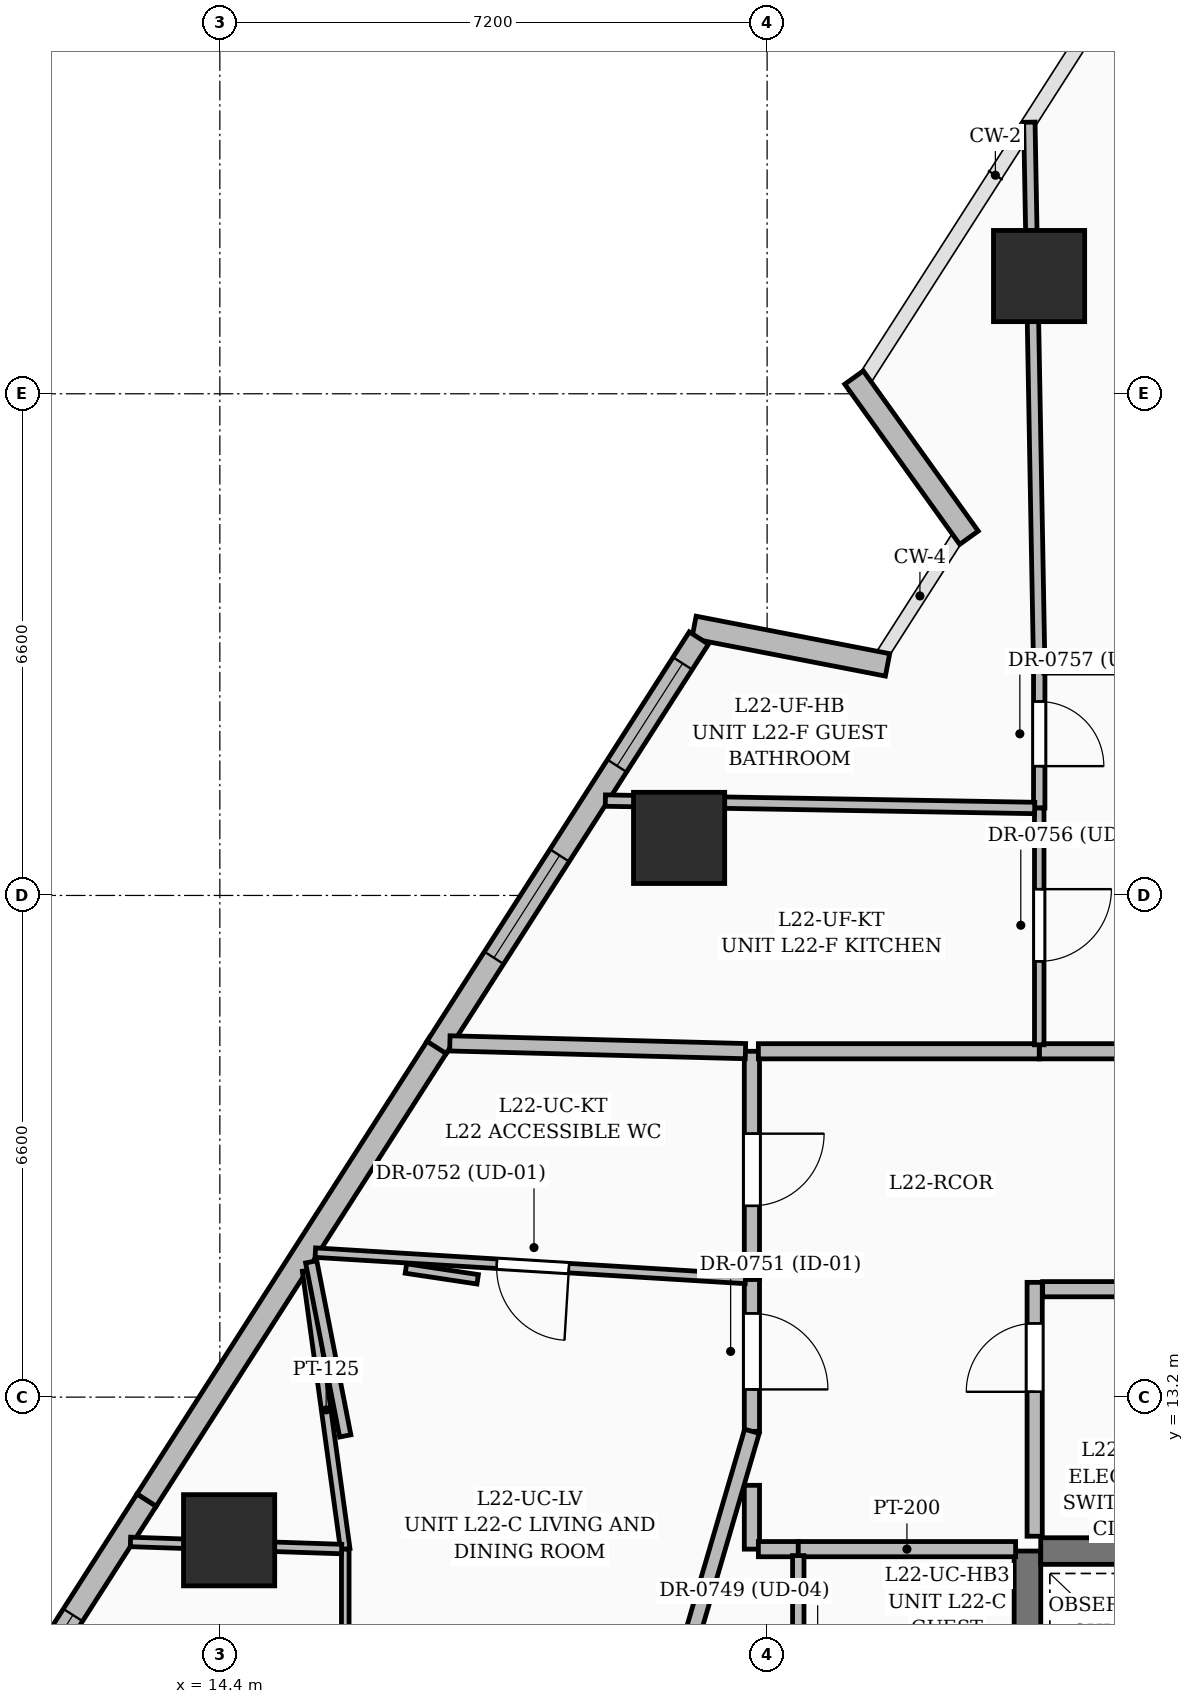
"""IFC4 building model, lengths in metres.
Left out: names, types, materials, properties, quantities, classifications, styles, units other than length and angle.
Written with IfcOpenShell. Run it as: python <this file> out.ifc"""

import sys

from ifc_helpers import new_model, si_unit, direction, frame, frame_2d, origin, origin_2d, place, context, subcontext, project, spatial, rectangle, extrude, element, fill, save


model = new_model("IFC4")
c1 = context("Model", 3, precision=1e-05, world=origin(), true_north=direction((0.0, 1.0)))
c2 = subcontext(c1, "Body", "Model", "MODEL_VIEW")
j1 = project(units=[si_unit("LENGTHUNIT", "METRE"), si_unit("PLANEANGLEUNIT", "RADIAN")], contexts=[c1])
p1 = place(None, origin())
s1 = spatial("IfcSite", under=j1, at=p1, CompositionType="ELEMENT")
p2 = place(p1, origin())
s2 = spatial("IfcBuilding", under=s1, at=p2, CompositionType="ELEMENT")
p3 = place(p2, frame((0.0, 0.0, 89.4)))
s3 = spatial("IfcBuildingStorey", under=s2, at=p3, CompositionType="ELEMENT", Elevation=89.4)
p4 = place(p3, frame((25.025, 6.225, 0.0), z_axis=(0.0, 0.0, 1.0), x_axis=(0.0, 1.0, 0.0)))
e1 = element("IfcWall", 1, at=p4, inside=s3, PredefinedType="SOLIDWALL", context=c2, shape_type="SweptSolid", body=[
    extrude(rectangle(XDim=4.95, YDim=0.35, at=frame_2d((2.475, 0.0))), origin(), (0.0, 0.0, 1.0), 3.6),
])
p5 = place(p3, frame((25.2, 11.175, 0.0), z_axis=(0.0, 0.0, 1.0), x_axis=(1.0, 0.0, 0.0)))
e2 = element("IfcWall", 2, at=p5, inside=s3, PredefinedType="SOLIDWALL", context=c2, shape_type="SweptSolid", body=[
    extrude(rectangle(XDim=1.9, YDim=0.35, at=frame_2d((0.95, 0.0))), origin(), (0.0, 0.0, 1.0), 3.6),
])
for number, where, z_axis, x_axis in (
    (3, (25.178, 27.949, 0.0), (0.0, 0.0, 1.0), (1.0, 0.0, 0.0)),
    (4, (20.442, 20.557, 0.0), (0.0, 0.0, 1.0), (1.0, 0.0, 0.0)),
    (5, (14.522, 11.317, 0.0), (0.0, 0.0, 1.0), (1.0, 0.0, 0.0)),
):
    element("IfcColumn", number, at=place(p3, frame(where, z_axis=z_axis, x_axis=x_axis)), inside=s3, PredefinedType="COLUMN", context=c2, shape_type="SweptSolid", body=[
        extrude(rectangle(XDim=1.2, YDim=1.2, at=origin_2d()), origin(), (0.0, 0.0, 1.0), 3.6),
    ])
p6 = place(p3, frame((20.638, 23.327, 0.0), z_axis=(0.0, 0.0, 1.0), x_axis=(0.981760587394, -0.190121406053, 0.0)))
e6 = element("IfcWall", 6, at=p6, inside=s3, PredefinedType="SOLIDWALL", context=c2, shape_type="SweptSolid", body=[
    extrude(rectangle(XDim=2.594, YDim=0.3, at=frame_2d((1.297, 0.0))), origin(), (0.0, 0.0, 1.0), 2.375),
])
p7 = place(p3, frame((24.256, 24.506, 0.0), z_axis=(0.0, 0.0, 1.0), x_axis=(-0.58299973372, 0.812472344442, 0.0)))
e7 = element("IfcWall", 7, at=p7, inside=s3, PredefinedType="SOLIDWALL", context=c2, shape_type="SweptSolid", body=[
    extrude(rectangle(XDim=2.594, YDim=0.3, at=frame_2d((1.297, 0.0))), origin(), (0.0, 0.0, 1.0), 2.375),
])
p8 = place(p3, frame((10.059, 6.574, 0.0), z_axis=(0.0, 0.0, 1.0), x_axis=(0.539474072839, 0.842002211835, 0.0)))
e8 = element("IfcWall", 8, at=p8, inside=s3, PredefinedType="SOLIDWALL", context=c2, shape_type="SweptSolid", body=[
    extrude(rectangle(XDim=6.261, YDim=0.3, at=frame_2d((3.131, 0.0))), origin(), (0.0, 0.0, 1.0), 3.35),
])
p9 = place(p8, frame((2.365, 0.0, 0.55)))
e9 = element("IfcOpeningElement", 9, at=p9, cuts=e8, PredefinedType="OPENING", context=c2, shape_type="SweptSolid", body=[
    extrude(rectangle(XDim=2.1, YDim=2.4, at=frame_2d((1.05, 1.2))), frame((0.0, 0.16, 0.0), z_axis=(0.0, -1.0, 0.0), x_axis=(1.0, 0.0, 0.0)), (0.0, 0.0, 1.0), 0.32),
])
p10 = place(p3, frame((13.437, 11.846, 0.0), z_axis=(0.0, 0.0, 1.0), x_axis=(0.539467581629, 0.842006370743, 0.0)))
e10 = element("IfcWall", 10, at=p10, inside=s3, PredefinedType="SOLIDWALL", context=c2, shape_type="SweptSolid", body=[
    extrude(rectangle(XDim=7.13, YDim=0.3, at=frame_2d((3.565, 0.0))), origin(), (0.0, 0.0, 1.0), 3.35),
])
p11 = place(p3, frame((17.251, 17.8, 0.0), z_axis=(0.0, 0.0, 1.0), x_axis=(0.539458702909, 0.84201205921, 0.0)))
e11 = element("IfcWall", 11, at=p11, inside=s3, PredefinedType="SOLIDWALL", context=c2, shape_type="SweptSolid", body=[
    extrude(rectangle(XDim=6.396, YDim=0.3, at=frame_2d((3.198, 0.0))), origin(), (0.0, 0.0, 1.0), 3.35),
])
p12 = place(p11, frame((4.4, 0.0, 0.55)))
e12 = element("IfcOpeningElement", 12, at=p12, cuts=e11, PredefinedType="OPENING", context=c2, shape_type="SweptSolid", body=[
    extrude(rectangle(XDim=1.6, YDim=2.2, at=frame_2d((0.8, 1.1))), frame((0.0, 0.16, 0.0), z_axis=(0.0, -1.0, 0.0), x_axis=(1.0, 0.0, 0.0)), (0.0, 0.0, 1.0), 0.32),
])
p13 = place(p11, frame((1.4, 0.0, 0.55)))
e13 = element("IfcOpeningElement", 13, at=p13, cuts=e11, PredefinedType="OPENING", context=c2, shape_type="SweptSolid", body=[
    extrude(rectangle(XDim=1.6, YDim=2.2, at=frame_2d((0.8, 1.1))), frame((0.0, 0.16, 0.0), z_axis=(0.0, -1.0, 0.0), x_axis=(1.0, 0.0, 0.0)), (0.0, 0.0, 1.0), 0.32),
])
p14 = place(p3, frame((25.12, 11.37, 0.0), z_axis=(0.0, 0.0, 1.0), x_axis=(0.0, 1.0, 0.0)))
e14 = element("IfcWall", 14, at=p14, inside=s3, PredefinedType="PARTITIONING", context=c2, shape_type="SweptSolid", body=[
    extrude(rectangle(XDim=3.34, YDim=0.2, at=frame_2d((1.67, 0.0))), origin(), (0.0, 0.0, 1.0), 3.35),
])
p15 = place(p14, frame((1.9, 0.0, 0.0)))
e15 = element("IfcOpeningElement", 15, at=p15, cuts=e14, PredefinedType="OPENING", context=c2, shape_type="SweptSolid", body=[
    extrude(rectangle(XDim=0.9, YDim=2.1, at=frame_2d((0.45, 1.05))), frame((0.0, 0.11, 0.0), z_axis=(0.0, -1.0, 0.0), x_axis=(1.0, 0.0, 0.0)), (0.0, 0.0, 1.0), 0.22),
])
p16 = place(p3, frame((25.225, 14.62, 0.0), z_axis=(0.0, 0.0, 1.0), x_axis=(1.0, 0.0, 0.0)))
e16 = element("IfcWall", 16, at=p16, inside=s3, PredefinedType="PARTITIONING", context=c2, shape_type="SweptSolid", body=[
    extrude(rectangle(XDim=1.86, YDim=0.2, at=frame_2d((0.93, 0.0))), origin(), (0.0, 0.0, 1.0), 3.35),
])
p17 = place(p3, frame((21.4, 12.04, 0.0), z_axis=(0.0, 0.0, 1.0), x_axis=(0.0, -1.0, 0.0)))
e17 = element("IfcWall", 17, at=p17, inside=s3, PredefinedType="PARTITIONING", context=c2, shape_type="SweptSolid", body=[
    extrude(rectangle(XDim=0.84, YDim=0.2, at=frame_2d((0.42, 0.0))), origin(), (0.0, 0.0, 1.0), 3.35),
])
p18 = place(p3, frame((21.485, 11.2, 0.0), z_axis=(0.0, 0.0, 1.0), x_axis=(1.0, 0.0, 0.0)))
e18 = element("IfcWall", 18, at=p18, inside=s3, PredefinedType="PARTITIONING", context=c2, shape_type="SweptSolid", body=[
    extrude(rectangle(XDim=0.525, YDim=0.2, at=frame_2d((0.262, 0.0))), origin(), (0.0, 0.0, 1.0), 3.35),
])
p19 = place(p3, frame((22.01, 11.2, 0.0), z_axis=(0.0, 0.0, 1.0), x_axis=(1.0, 0.0, 0.0)))
e19 = element("IfcWall", 19, at=p19, inside=s3, PredefinedType="PARTITIONING", context=c2, shape_type="SweptSolid", body=[
    extrude(rectangle(XDim=2.859, YDim=0.2, at=frame_2d((1.43, 0.0))), origin(), (0.0, 0.0, 1.0), 3.35),
])
p20 = place(p3, frame((21.4, 14.75, 0.0), z_axis=(0.0, 0.0, 1.0), x_axis=(0.0, -1.0, 0.0)))
e20 = element("IfcWall", 20, at=p20, inside=s3, PredefinedType="PARTITIONING", context=c2, shape_type="SweptSolid", body=[
    extrude(rectangle(XDim=2.0, YDim=0.2, at=frame_2d((1.0, 0.0))), origin(), (0.0, 0.0, 1.0), 2.771),
])
p21 = place(p20, frame((0.448, 0.0, 0.0)))
e21 = element("IfcOpeningElement", 21, at=p21, cuts=e20, PredefinedType="OPENING", context=c2, shape_type="SweptSolid", body=[
    extrude(rectangle(XDim=1.0, YDim=2.2, at=frame_2d((0.5, 1.1))), frame((0.0, 0.11, 0.0), z_axis=(0.0, -1.0, 0.0), x_axis=(1.0, 0.0, 0.0)), (0.0, 0.0, 1.0), 0.22),
])
p22 = place(p3, frame((21.4, 17.75, 0.0), z_axis=(0.0, 0.0, 1.0), x_axis=(0.0, -1.0, 0.0)))
e22 = element("IfcWall", 22, at=p22, inside=s3, PredefinedType="PARTITIONING", context=c2, shape_type="SweptSolid", body=[
    extrude(rectangle(XDim=3.0, YDim=0.2, at=frame_2d((1.5, 0.0))), origin(), (0.0, 0.0, 1.0), 2.771),
])
p23 = place(p22, frame((1.084, 0.0, 0.0)))
e23 = element("IfcOpeningElement", 23, at=p23, cuts=e22, PredefinedType="OPENING", context=c2, shape_type="SweptSolid", body=[
    extrude(rectangle(XDim=0.95, YDim=2.2, at=frame_2d((0.475, 1.1))), frame((0.0, 0.11, 0.0), z_axis=(0.0, -1.0, 0.0), x_axis=(1.0, 0.0, 0.0)), (0.0, 0.0, 1.0), 0.22),
])
p24 = place(p3, frame((33.34, 17.75, 0.0), z_axis=(0.0, 0.0, 1.0), x_axis=(-1.0, 0.0, 0.0)))
e24 = element("IfcWall", 24, at=p24, inside=s3, PredefinedType="PARTITIONING", context=c2, shape_type="SweptSolid", body=[
    extrude(rectangle(XDim=8.16, YDim=0.2, at=frame_2d((4.08, 0.0))), origin(), (0.0, 0.0, 1.0), 2.771),
])
p25 = place(p24, frame((3.58, 0.0, 0.0)))
e25 = element("IfcOpeningElement", 25, at=p25, cuts=e24, PredefinedType="OPENING", context=c2, shape_type="SweptSolid", body=[
    extrude(rectangle(XDim=1.0, YDim=2.2, at=frame_2d((0.5, 1.1))), frame((0.0, 0.11, 0.0), z_axis=(0.0, -1.0, 0.0), x_axis=(1.0, 0.0, 0.0)), (0.0, 0.0, 1.0), 0.22),
])
p26 = place(p3, frame((25.18, 17.75, 0.0), z_axis=(0.0, 0.0, 1.0), x_axis=(-1.0, 0.0, 0.0)))
e26 = element("IfcWall", 26, at=p26, inside=s3, PredefinedType="PARTITIONING", context=c2, shape_type="SweptSolid", body=[
    extrude(rectangle(XDim=3.695, YDim=0.2, at=frame_2d((1.847, 0.0))), origin(), (0.0, 0.0, 1.0), 2.345),
])
p27 = place(p3, frame((22.01, 7.57, 0.0), z_axis=(0.0, 0.0, 1.0), x_axis=(0.0, 1.0, 0.0)))
e27 = element("IfcWall", 27, at=p27, inside=s3, PredefinedType="PARTITIONING", context=c2, shape_type="SweptSolid", body=[
    extrude(rectangle(XDim=3.545, YDim=0.15, at=frame_2d((1.772, 0.0))), origin(), (0.0, 0.0, 1.0), 2.345),
])
p28 = place(p27, frame((1.688, 0.0, 0.0)))
e28 = element("IfcOpeningElement", 28, at=p28, cuts=e27, PredefinedType="OPENING", context=c2, shape_type="SweptSolid", body=[
    extrude(rectangle(XDim=0.85, YDim=2.1, at=frame_2d((0.425, 1.05))), frame((0.0, 0.085, 0.0), z_axis=(0.0, -1.0, 0.0), x_axis=(1.0, 0.0, 0.0)), (0.0, 0.0, 1.0), 0.17),
])
p29 = place(p3, frame((21.4, 12.75, 0.0), z_axis=(0.0, 0.0, 1.0), x_axis=(-0.281267694056, -0.959629347342, 0.0)))
e29 = element("IfcWall", 29, at=p29, inside=s3, PredefinedType="PARTITIONING", context=c2, shape_type="SweptSolid", body=[
    extrude(rectangle(XDim=11.313, YDim=0.2, at=frame_2d((5.656, 0.0))), origin(), (0.0, 0.0, 1.0), 2.345),
])
p30 = place(p29, frame((5.147, 0.0, 0.0)))
e30 = element("IfcOpeningElement", 30, at=p30, cuts=e29, PredefinedType="OPENING", context=c2, shape_type="SweptSolid", body=[
    extrude(rectangle(XDim=1.0, YDim=2.2, at=frame_2d((0.5, 1.1))), frame((0.0, 0.11, 0.0), z_axis=(0.0, -1.0, 0.0), x_axis=(1.0, 0.0, 0.0)), (0.0, 0.0, 1.0), 0.22),
])
p31 = place(p3, frame((21.315, 14.755, 0.0), z_axis=(0.0, 0.0, 1.0), x_axis=(-0.99813414118, 0.061059284391, 0.0)))
e31 = element("IfcWall", 31, at=p31, inside=s3, PredefinedType="PARTITIONING", context=c2, shape_type="SweptSolid", body=[
    extrude(rectangle(XDim=5.67, YDim=0.125, at=frame_2d((2.835, 0.0))), origin(), (0.0, 0.0, 1.0), 2.37),
])
p32 = place(p31, frame((2.327, 0.0, 0.0)))
e32 = element("IfcOpeningElement", 32, at=p32, cuts=e31, PredefinedType="OPENING", context=c2, shape_type="SweptSolid", body=[
    extrude(rectangle(XDim=0.95, YDim=2.2, at=frame_2d((0.475, 1.1))), frame((0.0, 0.072, 0.0), z_axis=(0.0, -1.0, 0.0), x_axis=(1.0, 0.0, 0.0)), (0.0, 0.0, 1.0), 0.145),
])
p33 = place(p3, frame((15.547, 14.865, 0.0), z_axis=(0.0, 0.0, 1.0), x_axis=(0.135967318148, -0.990713323013, 0.0)))
e33 = element("IfcWall", 33, at=p33, inside=s3, PredefinedType="PARTITIONING", context=c2, shape_type="SweptSolid", body=[
    extrude(rectangle(XDim=3.699, YDim=0.125, at=frame_2d((1.85, 0.0))), origin(), (0.0, 0.0, 1.0), 2.37),
])
p34 = place(p3, frame((16.05, 11.2, 0.0), z_axis=(0.0, 0.0, 1.0), x_axis=(0.0, -1.0, 0.0)))
e34 = element("IfcWall", 34, at=p34, inside=s3, PredefinedType="PARTITIONING", context=c2, shape_type="SweptSolid", body=[
    extrude(rectangle(XDim=6.56, YDim=0.1, at=frame_2d((3.28, 0.0))), origin(), (0.0, 0.0, 1.0), 2.345),
])
p35 = place(p34, frame((2.77, 0.0, 0.0)))
e35 = element("IfcOpeningElement", 35, at=p35, cuts=e34, PredefinedType="OPENING", context=c2, shape_type="SweptSolid", body=[
    extrude(rectangle(XDim=0.9, YDim=2.15, at=frame_2d((0.45, 1.075))), frame((0.0, 0.06, 0.0), z_axis=(0.0, -1.0, 0.0), x_axis=(1.0, 0.0, 0.0)), (0.0, 0.0, 1.0), 0.12),
])
p36 = place(p3, frame((13.224, 11.295, 0.0), z_axis=(0.0, 0.0, 1.0), x_axis=(0.999434133118, -0.033636491475, 0.0)))
e36 = element("IfcWall", 36, at=p36, inside=s3, PredefinedType="PARTITIONING", context=c2, shape_type="SweptSolid", body=[
    extrude(rectangle(XDim=2.78, YDim=0.125, at=frame_2d((1.39, 0.0))), origin(), (0.0, 0.0, 1.0), 2.345),
])
p37 = place(p3, frame((21.315, 17.752, 0.0), z_axis=(0.0, 0.0, 1.0), x_axis=(-0.999654223299, 0.02629512961, 0.0)))
e37 = element("IfcWall", 37, at=p37, inside=s3, PredefinedType="PARTITIONING", context=c2, shape_type="SweptSolid", body=[
    extrude(rectangle(XDim=3.89, YDim=0.2, at=frame_2d((1.945, 0.0))), origin(), (0.0, 0.0, 1.0), 2.37),
])
p38 = place(p3, frame((25.18, 22.8, 0.0), z_axis=(0.0, 0.0, 1.0), x_axis=(0.0, -1.0, 0.0)))
e38 = element("IfcWall", 38, at=p38, inside=s3, PredefinedType="PARTITIONING", context=c2, shape_type="SweptSolid", body=[
    extrude(rectangle(XDim=1.85, YDim=0.15, at=frame_2d((0.925, 0.0))), origin(), (0.0, 0.0, 1.0), 2.771),
])
p39 = place(p38, frame((0.448, 0.0, 0.0)))
e39 = element("IfcOpeningElement", 39, at=p39, cuts=e38, PredefinedType="OPENING", context=c2, shape_type="SweptSolid", body=[
    extrude(rectangle(XDim=0.85, YDim=2.1, at=frame_2d((0.425, 1.05))), frame((0.0, 0.085, 0.0), z_axis=(0.0, -1.0, 0.0), x_axis=(1.0, 0.0, 0.0)), (0.0, 0.0, 1.0), 0.17),
])
p40 = place(p3, frame((25.18, 20.95, 0.0), z_axis=(0.0, 0.0, 1.0), x_axis=(0.0, -1.0, 0.0)))
e40 = element("IfcWall", 40, at=p40, inside=s3, PredefinedType="PARTITIONING", context=c2, shape_type="SweptSolid", body=[
    extrude(rectangle(XDim=3.115, YDim=0.125, at=frame_2d((1.558, 0.0))), origin(), (0.0, 0.0, 1.0), 2.771),
])
p41 = place(p40, frame((1.067, 0.0, 0.0)))
e41 = element("IfcOpeningElement", 41, at=p41, cuts=e40, PredefinedType="OPENING", context=c2, shape_type="SweptSolid", body=[
    extrude(rectangle(XDim=0.95, YDim=2.2, at=frame_2d((0.475, 1.1))), frame((0.0, 0.072, 0.0), z_axis=(0.0, -1.0, 0.0), x_axis=(1.0, 0.0, 0.0)), (0.0, 0.0, 1.0), 0.145),
])
p42 = place(p3, frame((32.91, 22.8, 0.0), z_axis=(0.0, 0.0, 1.0), x_axis=(-1.0, 0.0, 0.0)))
e42 = element("IfcWall", 42, at=p42, inside=s3, PredefinedType="PARTITIONING", context=c2, shape_type="SweptSolid", body=[
    extrude(rectangle(XDim=7.67, YDim=0.15, at=frame_2d((3.835, 0.0))), origin(), (0.0, 0.0, 1.0), 2.345),
])
p43 = place(p42, frame((3.449, 0.0, 0.0)))
e43 = element("IfcOpeningElement", 43, at=p43, cuts=e42, PredefinedType="OPENING", context=c2, shape_type="SweptSolid", body=[
    extrude(rectangle(XDim=0.95, YDim=2.2, at=frame_2d((0.475, 1.1))), frame((0.0, 0.085, 0.0), z_axis=(0.0, -1.0, 0.0), x_axis=(1.0, 0.0, 0.0)), (0.0, 0.0, 1.0), 0.17),
])
p44 = place(p3, frame((19.472, 21.048, 0.0), z_axis=(0.0, 0.0, 1.0), x_axis=(0.999851310631, -0.017244031681, 0.0)))
e44 = element("IfcWall", 44, at=p44, inside=s3, PredefinedType="PARTITIONING", context=c2, shape_type="SweptSolid", body=[
    extrude(rectangle(XDim=5.649, YDim=0.15, at=frame_2d((2.824, 0.0))), origin(), (0.0, 0.0, 1.0), 2.37),
])
p45 = place(p3, frame((25.18, 22.8, 0.0), z_axis=(0.0, 0.0, 1.0), x_axis=(-0.018104588305, 0.999836098509, 0.0)))
e45 = element("IfcWall", 45, at=p45, inside=s3, PredefinedType="PARTITIONING", context=c2, shape_type="SweptSolid", body=[
    extrude(rectangle(XDim=7.174, YDim=0.15, at=frame_2d((3.587, 0.0))), origin(), (0.0, 0.0, 1.0), 2.37),
])
p46 = place(p3, frame((17.792, 14.75, 0.0), z_axis=(0.0, 0.0, 1.0), x_axis=(-0.988863080903, 0.14882811303, 0.0)))
e46 = element("IfcWall", 46, at=p46, inside=s3, PredefinedType="PARTITIONING", context=c2, shape_type="SweptSolid", body=[
    extrude(rectangle(XDim=0.955, YDim=0.125, at=frame_2d((0.478, 0.0))), origin(), (0.0, 0.0, 1.0), 2.37),
])
p47 = place(p3, frame((16.05, 12.69, 0.0), z_axis=(0.0, 0.0, 1.0), x_axis=(-0.191989700007, 0.981396940637, 0.0)))
e47 = element("IfcWall", 47, at=p47, inside=s3, PredefinedType="PARTITIONING", context=c2, shape_type="SweptSolid", body=[
    extrude(rectangle(XDim=2.333, YDim=0.15, at=frame_2d((1.167, 0.0))), origin(), (0.0, 0.0, 1.0), 2.37),
])
p48 = place(p9, origin())
e48 = element("IfcWindow", 48, at=p48, inside=s3, PartitioningType="SINGLE_PANEL", PredefinedType="WINDOW", context=c2, shape_type="SweptSolid", body=[
    extrude(rectangle(XDim=2.1, YDim=2.4, at=frame_2d((1.05, 1.2))), frame((0.0, 0.03, 0.0), z_axis=(0.0, -1.0, 0.0), x_axis=(1.0, 0.0, 0.0)), (0.0, 0.0, 1.0), 0.06),
])
fill(e9, e48)
p49 = place(p12, origin())
e49 = element("IfcWindow", 49, at=p49, inside=s3, PartitioningType="SINGLE_PANEL", PredefinedType="WINDOW", context=c2, shape_type="SweptSolid", body=[
    extrude(rectangle(XDim=1.6, YDim=2.2, at=frame_2d((0.8, 1.1))), frame((0.0, 0.03, 0.0), z_axis=(0.0, -1.0, 0.0), x_axis=(1.0, 0.0, 0.0)), (0.0, 0.0, 1.0), 0.06),
])
fill(e12, e49)
p50 = place(p13, origin())
e50 = element("IfcWindow", 50, at=p50, inside=s3, PartitioningType="SINGLE_PANEL", PredefinedType="WINDOW", context=c2, shape_type="SweptSolid", body=[
    extrude(rectangle(XDim=1.6, YDim=2.2, at=frame_2d((0.8, 1.1))), frame((0.0, 0.03, 0.0), z_axis=(0.0, -1.0, 0.0), x_axis=(1.0, 0.0, 0.0)), (0.0, 0.0, 1.0), 0.06),
])
fill(e13, e50)
p51 = place(p15, origin())
e51 = element("IfcDoor", 51, at=p51, inside=s3, OperationType="SINGLE_SWING_LEFT", PredefinedType="DOOR", context=c2, shape_type="SweptSolid", body=[
    extrude(rectangle(XDim=0.9, YDim=2.1, at=frame_2d((0.45, 1.05))), frame((0.0, 0.025, 0.0), z_axis=(0.0, -1.0, 0.0), x_axis=(1.0, 0.0, 0.0)), (0.0, 0.0, 1.0), 0.05),
])
fill(e15, e51)
p52 = place(p21, origin())
e52 = element("IfcDoor", 52, at=p52, inside=s3, OperationType="SINGLE_SWING_RIGHT", PredefinedType="DOOR", context=c2, shape_type="SweptSolid", body=[
    extrude(rectangle(XDim=1.0, YDim=2.2, at=frame_2d((0.5, 1.1))), frame((0.0, 0.025, 0.0), z_axis=(0.0, -1.0, 0.0), x_axis=(1.0, 0.0, 0.0)), (0.0, 0.0, 1.0), 0.05),
])
fill(e21, e52)
p53 = place(p32, origin())
e53 = element("IfcDoor", 53, at=p53, inside=s3, OperationType="SINGLE_SWING_LEFT", PredefinedType="DOOR", context=c2, shape_type="SweptSolid", body=[
    extrude(rectangle(XDim=0.95, YDim=2.2, at=frame_2d((0.475, 1.1))), frame((0.0, 0.025, 0.0), z_axis=(0.0, -1.0, 0.0), x_axis=(1.0, 0.0, 0.0)), (0.0, 0.0, 1.0), 0.05),
])
fill(e32, e53)
p54 = place(p41, origin())
e54 = element("IfcDoor", 54, at=p54, inside=s3, OperationType="SINGLE_SWING_LEFT", PredefinedType="DOOR", context=c2, shape_type="SweptSolid", body=[
    extrude(rectangle(XDim=0.95, YDim=2.2, at=frame_2d((0.475, 1.1))), frame((0.0, 0.025, 0.0), z_axis=(0.0, -1.0, 0.0), x_axis=(1.0, 0.0, 0.0)), (0.0, 0.0, 1.0), 0.05),
])
fill(e41, e54)
p55 = place(p39, origin())
e55 = element("IfcDoor", 55, at=p55, inside=s3, OperationType="SINGLE_SWING_RIGHT", PredefinedType="DOOR", context=c2, shape_type="SweptSolid", body=[
    extrude(rectangle(XDim=0.85, YDim=2.1, at=frame_2d((0.425, 1.05))), frame((0.0, 0.025, 0.0), z_axis=(0.0, -1.0, 0.0), x_axis=(1.0, 0.0, 0.0)), (0.0, 0.0, 1.0), 0.05),
])
fill(e39, e55)
p56 = place(p23, origin())
e56 = element("IfcDoor", 56, at=p56, inside=s3, OperationType="SINGLE_SWING_LEFT", PredefinedType="DOOR", context=c2, shape_type="SweptSolid", body=[
    extrude(rectangle(XDim=0.95, YDim=2.2, at=frame_2d((0.475, 1.1))), frame((0.0, 0.025, 0.0), z_axis=(0.0, -1.0, 0.0), x_axis=(1.0, 0.0, 0.0)), (0.0, 0.0, 1.0), 0.05),
])
fill(e23, e56)
save(model, sys.argv[1])
